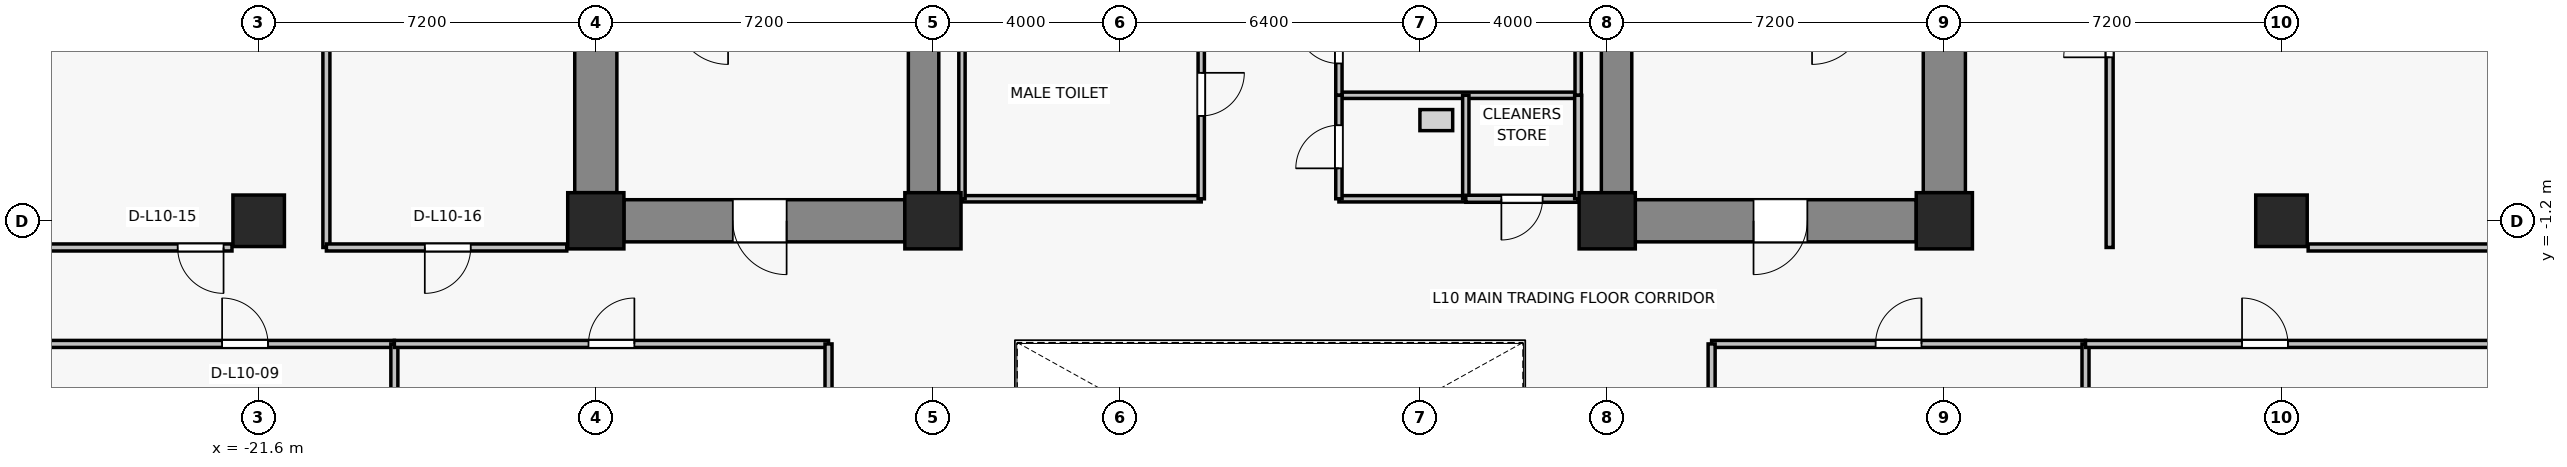
"""IFC4 building model, lengths in metres.
Left out: names, types, materials, properties, quantities, classifications, styles, units other than length and angle.
Written with IfcOpenShell. Run it as: python <this file> out.ifc"""

import sys

from ifc_helpers import new_model, si_unit, direction, frame, frame_2d, origin, origin_2d, place, context, subcontext, project, spatial, rectangle, extrude, source, transform, mapped, element, fill, save


model = new_model("IFC4")
c1 = context("Model", 3, precision=1e-05, world=origin(), true_north=direction((0.0, 1.0)))
c2 = subcontext(c1, "Body", "Model", "MODEL_VIEW")
j1 = project(units=[si_unit("LENGTHUNIT", "METRE"), si_unit("PLANEANGLEUNIT", "RADIAN")], contexts=[c1])
p1 = place(None, origin())
s1 = spatial("IfcSite", under=j1, at=p1, CompositionType="ELEMENT")
p2 = place(p1, origin())
s2 = spatial("IfcBuilding", under=s1, at=p2, CompositionType="ELEMENT")
p3 = place(p2, frame((0.0, 0.0, 40.6)))
s3 = spatial("IfcBuildingStorey", under=s2, at=p3, CompositionType="ELEMENT", Elevation=40.6)
for number, where, z_axis, x_axis in (
    (1, (-14.4, -1.2, 0.0), (0.0, 0.0, 1.0), (1.0, 0.0, 0.0)),
    (2, (-7.2, -1.2, 0.0), (0.0, 0.0, 1.0), (1.0, 0.0, 0.0)),
    (3, (7.2, -1.2, 0.0), (0.0, 0.0, 1.0), (1.0, 0.0, 0.0)),
    (4, (14.4, -1.2, 0.0), (0.0, 0.0, 1.0), (1.0, 0.0, 0.0)),
):
    element("IfcColumn", number, at=place(p3, frame(where, z_axis=z_axis, x_axis=x_axis)), inside=s3, PredefinedType="COLUMN", context=c2, shape_type="SweptSolid", body=[
        extrude(rectangle(XDim=1.2, YDim=1.2, at=origin_2d()), origin(), (0.0, 0.0, 1.0), 3.3),
    ])
for number, where, z_axis, x_axis in (
    (5, (-21.6, -1.2, 0.0), (0.0, 0.0, 1.0), (1.0, 0.0, 0.0)),
    (6, (21.6, -1.2, 0.0), (0.0, 0.0, 1.0), (1.0, 0.0, 0.0)),
):
    element("IfcColumn", number, at=place(p3, frame(where, z_axis=z_axis, x_axis=x_axis)), inside=s3, PredefinedType="COLUMN", context=c2, shape_type="SweptSolid", body=[
        extrude(rectangle(XDim=1.1, YDim=1.1, at=origin_2d()), origin(), (0.0, 0.0, 1.0), 3.3),
    ])
for number, where, z_axis, x_axis in (
    (7, (-14.4, -0.6, 0.0), (0.0, 0.0, 1.0), (0.0, 1.0, 0.0)),
    (8, (14.4, -0.6, 0.0), (0.0, 0.0, 1.0), (0.0, 1.0, 0.0)),
):
    element("IfcWall", number, at=place(p3, frame(where, z_axis=z_axis, x_axis=x_axis)), inside=s3, PredefinedType="SHEAR", context=c2, shape_type="SweptSolid", body=[
        extrude(rectangle(XDim=6.6, YDim=0.9, at=frame_2d((3.3, 0.0))), origin(), (0.0, 0.0, 1.0), 3.075),
    ])
p4 = place(p3, frame((-7.8, -1.2, 0.0), z_axis=(0.0, 0.0, 1.0), x_axis=(-1.0, 0.0, 0.0)))
e9 = element("IfcWall", 9, at=p4, inside=s3, PredefinedType="SHEAR", context=c2, shape_type="SweptSolid", body=[
    extrude(rectangle(XDim=6.0, YDim=0.9, at=frame_2d((3.0, 0.0))), origin(), (0.0, 0.0, 1.0), 3.075),
])
p5 = place(p4, frame((2.525, 0.0, 0.0)))
e10 = element("IfcOpeningElement", 10, at=p5, cuts=e9, PredefinedType="OPENING", context=c2, shape_type="SweptSolid", body=[
    extrude(rectangle(XDim=1.15, YDim=2.15, at=frame_2d((0.575, 1.075))), frame((0.0, 0.46, 0.0), z_axis=(0.0, -1.0, 0.0), x_axis=(1.0, 0.0, 0.0)), (0.0, 0.0, 1.0), 0.92),
])
p6 = place(p3, frame((13.8, -1.2, 0.0), z_axis=(0.0, 0.0, 1.0), x_axis=(-1.0, 0.0, 0.0)))
e11 = element("IfcWall", 11, at=p6, inside=s3, PredefinedType="SHEAR", context=c2, shape_type="SweptSolid", body=[
    extrude(rectangle(XDim=6.0, YDim=0.9, at=frame_2d((3.0, 0.0))), origin(), (0.0, 0.0, 1.0), 3.075),
])
p7 = place(p6, frame((2.325, 0.0, 0.0)))
e12 = element("IfcOpeningElement", 12, at=p7, cuts=e11, PredefinedType="OPENING", context=c2, shape_type="SweptSolid", body=[
    extrude(rectangle(XDim=1.15, YDim=2.15, at=frame_2d((0.575, 1.075))), frame((0.0, 0.46, 0.0), z_axis=(0.0, -1.0, 0.0), x_axis=(1.0, 0.0, 0.0)), (0.0, 0.0, 1.0), 0.92),
])
for number, where, z_axis, x_axis in (
    (13, (-7.4, -0.75, 0.0), (0.0, 0.0, 1.0), (0.0, 1.0, 0.0)),
    (14, (7.4, -0.75, 0.0), (0.0, 0.0, 1.0), (0.0, 1.0, 0.0)),
):
    element("IfcWall", number, at=place(p3, frame(where, z_axis=z_axis, x_axis=x_axis)), inside=s3, PredefinedType="SHEAR", context=c2, shape_type="SweptSolid", body=[
        extrude(rectangle(XDim=4.0, YDim=0.65, at=frame_2d((2.0, 0.0))), origin(), (0.0, 0.0, 1.0), 3.075),
    ])
p8 = place(p3, frame((-1.47, -0.73, 0.0), z_axis=(0.0, 0.0, 1.0), x_axis=(-1.0, 0.0, 0.0)))
e15 = element("IfcWall", 15, at=p8, inside=s3, PredefinedType="PARTITIONING", context=c2, shape_type="SweptSolid", body=[
    extrude(rectangle(XDim=5.11, YDim=0.135, at=frame_2d((2.555, 0.0))), origin(), (0.0, 0.0, 1.0), 3.075),
])
p9 = place(p3, frame((-6.58, -0.73, 0.0), z_axis=(0.0, 0.0, 1.0), x_axis=(0.0, 1.0, 0.0)))
e16 = element("IfcWall", 16, at=p9, inside=s3, PredefinedType="PARTITIONING", context=c2, shape_type="SweptSolid", body=[
    extrude(rectangle(XDim=4.49, YDim=0.135, at=frame_2d((2.245, 0.0))), origin(), (0.0, 0.0, 1.0), 3.075),
])
p10 = place(p3, frame((-1.47, 3.76, 0.0), z_axis=(0.0, 0.0, 1.0), x_axis=(0.0, -1.0, 0.0)))
e17 = element("IfcWall", 17, at=p10, inside=s3, PredefinedType="PARTITIONING", context=c2, shape_type="SweptSolid", body=[
    extrude(rectangle(XDim=4.49, YDim=0.135, at=frame_2d((2.245, 0.0))), origin(), (0.0, 0.0, 1.0), 3.075),
])
p11 = place(p10, frame((1.8, 0.0, 0.0)))
e18 = element("IfcOpeningElement", 18, at=p11, cuts=e17, PredefinedType="OPENING", context=c2, shape_type="SweptSolid", body=[
    extrude(rectangle(XDim=0.92, YDim=2.1, at=frame_2d((0.46, 1.05))), frame((0.0, 0.077, 0.0), z_axis=(0.0, -1.0, 0.0), x_axis=(1.0, 0.0, 0.0)), (0.0, 0.0, 1.0), 0.155),
])
p12 = place(p3, frame((6.58, 1.48, 0.0), z_axis=(0.0, 0.0, 1.0), x_axis=(-1.0, 0.0, 0.0)))
e19 = element("IfcWall", 19, at=p12, inside=s3, PredefinedType="PARTITIONING", context=c2, shape_type="SweptSolid", body=[
    extrude(rectangle(XDim=5.11, YDim=0.135, at=frame_2d((2.555, 0.0))), origin(), (0.0, 0.0, 1.0), 3.075),
])
p13 = place(p3, frame((1.47, 1.48, 0.0), z_axis=(0.0, 0.0, 1.0), x_axis=(0.0, 1.0, 0.0)))
e20 = element("IfcWall", 20, at=p13, inside=s3, PredefinedType="PARTITIONING", context=c2, shape_type="SweptSolid", body=[
    extrude(rectangle(XDim=2.28, YDim=0.135, at=frame_2d((1.14, 0.0))), origin(), (0.0, 0.0, 1.0), 3.075),
])
p14 = place(p13, frame((0.68, 0.0, 0.0)))
e21 = element("IfcOpeningElement", 21, at=p14, cuts=e20, PredefinedType="OPENING", context=c2, shape_type="SweptSolid", body=[
    extrude(rectangle(XDim=0.92, YDim=2.1, at=frame_2d((0.46, 1.05))), frame((0.0, 0.077, 0.0), z_axis=(0.0, -1.0, 0.0), x_axis=(1.0, 0.0, 0.0)), (0.0, 0.0, 1.0), 0.155),
])
p15 = place(p3, frame((6.58, 3.76, 0.0), z_axis=(0.0, 0.0, 1.0), x_axis=(0.0, -1.0, 0.0)))
e22 = element("IfcWall", 22, at=p15, inside=s3, PredefinedType="PARTITIONING", context=c2, shape_type="SweptSolid", body=[
    extrude(rectangle(XDim=2.28, YDim=0.135, at=frame_2d((1.14, 0.0))), origin(), (0.0, 0.0, 1.0), 3.075),
])
p16 = place(p3, frame((4.18, -0.73, 0.0), z_axis=(0.0, 0.0, 1.0), x_axis=(-1.0, 0.0, 0.0)))
e23 = element("IfcWall", 23, at=p16, inside=s3, PredefinedType="PARTITIONING", context=c2, shape_type="SweptSolid", body=[
    extrude(rectangle(XDim=2.71, YDim=0.135, at=frame_2d((1.355, 0.0))), origin(), (0.0, 0.0, 1.0), 3.075),
])
p17 = place(p3, frame((1.47, -0.73, 0.0), z_axis=(0.0, 0.0, 1.0), x_axis=(0.0, 1.0, 0.0)))
e24 = element("IfcWall", 24, at=p17, inside=s3, PredefinedType="PARTITIONING", context=c2, shape_type="SweptSolid", body=[
    extrude(rectangle(XDim=2.21, YDim=0.135, at=frame_2d((1.105, 0.0))), origin(), (0.0, 0.0, 1.0), 3.075),
])
p18 = place(p17, frame((0.65, 0.0, 0.0)))
e25 = element("IfcOpeningElement", 25, at=p18, cuts=e24, PredefinedType="OPENING", context=c2, shape_type="SweptSolid", body=[
    extrude(rectangle(XDim=0.92, YDim=2.1, at=frame_2d((0.46, 1.05))), frame((0.0, 0.077, 0.0), z_axis=(0.0, -1.0, 0.0), x_axis=(1.0, 0.0, 0.0)), (0.0, 0.0, 1.0), 0.155),
])
p19 = place(p3, frame((4.18, 1.48, 0.0), z_axis=(0.0, 0.0, 1.0), x_axis=(0.0, -1.0, 0.0)))
e26 = element("IfcWall", 26, at=p19, inside=s3, PredefinedType="PARTITIONING", context=c2, shape_type="SweptSolid", body=[
    extrude(rectangle(XDim=2.21, YDim=0.135, at=frame_2d((1.105, 0.0))), origin(), (0.0, 0.0, 1.0), 3.075),
])
p20 = place(p3, frame((6.58, -0.73, 0.0), z_axis=(0.0, 0.0, 1.0), x_axis=(-1.0, 0.0, 0.0)))
e27 = element("IfcWall", 27, at=p20, inside=s3, PredefinedType="PARTITIONING", context=c2, shape_type="SweptSolid", body=[
    extrude(rectangle(XDim=2.4, YDim=0.15, at=frame_2d((1.2, 0.0))), origin(), (0.0, 0.0, 1.0), 3.075),
])
p21 = place(p20, frame((0.76, 0.0, 0.0)))
e28 = element("IfcOpeningElement", 28, at=p21, cuts=e27, PredefinedType="OPENING", context=c2, shape_type="SweptSolid", body=[
    extrude(rectangle(XDim=0.88, YDim=2.1, at=frame_2d((0.44, 1.05))), frame((0.0, 0.085, 0.0), z_axis=(0.0, -1.0, 0.0), x_axis=(1.0, 0.0, 0.0)), (0.0, 0.0, 1.0), 0.17),
])
p22 = place(p3, frame((6.58, 1.48, 0.0), z_axis=(0.0, 0.0, 1.0), x_axis=(0.0, -1.0, 0.0)))
e29 = element("IfcWall", 29, at=p22, inside=s3, PredefinedType="PARTITIONING", context=c2, shape_type="SweptSolid", body=[
    extrude(rectangle(XDim=2.21, YDim=0.15, at=frame_2d((1.105, 0.0))), origin(), (0.0, 0.0, 1.0), 3.075),
])
p23 = place(p3, frame((-32.53, -3.83, 0.0), z_axis=(0.0, 0.0, 1.0), x_axis=(1.0, 0.0, 0.0)))
e30 = element("IfcWall", 30, at=p23, inside=s3, PredefinedType="PARTITIONING", context=c2, shape_type="SweptSolid", body=[
    extrude(rectangle(XDim=13.828, YDim=0.15, at=frame_2d((6.914, 0.0))), origin(), (0.0, 0.0, 1.0), 2.465),
])
p24 = place(p23, frame((10.149, 0.0, 0.0)))
e31 = element("IfcOpeningElement", 31, at=p24, cuts=e30, PredefinedType="OPENING", context=c2, shape_type="SweptSolid", body=[
    extrude(rectangle(XDim=0.98, YDim=2.15, at=frame_2d((0.49, 1.075))), frame((0.0, 0.085, 0.0), z_axis=(0.0, -1.0, 0.0), x_axis=(1.0, 0.0, 0.0)), (0.0, 0.0, 1.0), 0.17),
])
p25 = place(p3, frame((-18.702, -3.83, 0.0), z_axis=(0.0, 0.0, 1.0), x_axis=(0.0, -1.0, 0.0)))
e32 = element("IfcWall", 32, at=p25, inside=s3, PredefinedType="PARTITIONING", context=c2, shape_type="SweptSolid", body=[
    extrude(rectangle(XDim=6.69, YDim=0.15, at=frame_2d((3.345, 0.0))), origin(), (0.0, 0.0, 1.0), 2.465),
])
p26 = place(p3, frame((-18.702, -3.83, 0.0), z_axis=(0.0, 0.0, 1.0), x_axis=(1.0, 0.0, 0.0)))
e33 = element("IfcWall", 33, at=p26, inside=s3, PredefinedType="PARTITIONING", context=c2, shape_type="SweptSolid", body=[
    extrude(rectangle(XDim=9.272, YDim=0.15, at=frame_2d((4.636, 0.0))), origin(), (0.0, 0.0, 1.0), 2.465),
])
p27 = place(p26, frame((4.146, 0.0, 0.0)))
e34 = element("IfcOpeningElement", 34, at=p27, cuts=e33, PredefinedType="OPENING", context=c2, shape_type="SweptSolid", body=[
    extrude(rectangle(XDim=0.98, YDim=2.15, at=frame_2d((0.49, 1.075))), frame((0.0, 0.085, 0.0), z_axis=(0.0, -1.0, 0.0), x_axis=(1.0, 0.0, 0.0)), (0.0, 0.0, 1.0), 0.17),
])
p28 = place(p3, frame((-9.43, -3.83, 0.0), z_axis=(0.0, 0.0, 1.0), x_axis=(0.0, -1.0, 0.0)))
e35 = element("IfcWall", 35, at=p28, inside=s3, PredefinedType="PARTITIONING", context=c2, shape_type="SweptSolid", body=[
    extrude(rectangle(XDim=6.69, YDim=0.15, at=frame_2d((3.345, 0.0))), origin(), (0.0, 0.0, 1.0), 2.465),
])
p29 = place(p3, frame((9.43, -3.83, 0.0), z_axis=(0.0, 0.0, 1.0), x_axis=(1.0, 0.0, 0.0)))
e36 = element("IfcWall", 36, at=p29, inside=s3, PredefinedType="PARTITIONING", context=c2, shape_type="SweptSolid", body=[
    extrude(rectangle(XDim=7.985, YDim=0.15, at=frame_2d((3.993, 0.0))), origin(), (0.0, 0.0, 1.0), 2.465),
])
p30 = place(p29, frame((3.502, 0.0, 0.0)))
e37 = element("IfcOpeningElement", 37, at=p30, cuts=e36, PredefinedType="OPENING", context=c2, shape_type="SweptSolid", body=[
    extrude(rectangle(XDim=0.98, YDim=2.15, at=frame_2d((0.49, 1.075))), frame((0.0, 0.085, 0.0), z_axis=(0.0, -1.0, 0.0), x_axis=(1.0, 0.0, 0.0)), (0.0, 0.0, 1.0), 0.17),
])
for number, where, z_axis, x_axis in (
    (38, (9.43, -10.52, 0.0), (0.0, 0.0, 1.0), (0.0, 1.0, 0.0)),
    (39, (17.415, -3.83, 0.0), (0.0, 0.0, 1.0), (0.0, -1.0, 0.0)),
):
    element("IfcWall", number, at=place(p3, frame(where, z_axis=z_axis, x_axis=x_axis)), inside=s3, PredefinedType="PARTITIONING", context=c2, shape_type="SweptSolid", body=[
        extrude(rectangle(XDim=6.69, YDim=0.15, at=frame_2d((3.345, 0.0))), origin(), (0.0, 0.0, 1.0), 2.465),
    ])
p31 = place(p3, frame((17.415, -3.83, 0.0), z_axis=(0.0, 0.0, 1.0), x_axis=(1.0, 0.0, 0.0)))
e40 = element("IfcWall", 40, at=p31, inside=s3, PredefinedType="PARTITIONING", context=c2, shape_type="SweptSolid", body=[
    extrude(rectangle(XDim=11.115, YDim=0.15, at=frame_2d((5.558, 0.0))), origin(), (0.0, 0.0, 1.0), 2.465),
])
p32 = place(p31, frame((3.343, 0.0, 0.0)))
e41 = element("IfcOpeningElement", 41, at=p32, cuts=e40, PredefinedType="OPENING", context=c2, shape_type="SweptSolid", body=[
    extrude(rectangle(XDim=0.98, YDim=2.15, at=frame_2d((0.49, 1.075))), frame((0.0, 0.085, 0.0), z_axis=(0.0, -1.0, 0.0), x_axis=(1.0, 0.0, 0.0)), (0.0, 0.0, 1.0), 0.17),
])
p33 = place(p3, frame((-22.17, -1.77, 0.0), z_axis=(0.0, 0.0, 1.0), x_axis=(-1.0, 0.0, 0.0)))
e42 = element("IfcWall", 42, at=p33, inside=s3, PredefinedType="PARTITIONING", context=c2, shape_type="SweptSolid", body=[
    extrude(rectangle(XDim=5.177, YDim=0.15, at=frame_2d((2.588, 0.0))), origin(), (0.0, 0.0, 1.0), 3.075),
])
p34 = place(p33, frame((0.18, 0.0, 0.0)))
e43 = element("IfcOpeningElement", 43, at=p34, cuts=e42, PredefinedType="OPENING", context=c2, shape_type="SweptSolid", body=[
    extrude(rectangle(XDim=0.98, YDim=2.15, at=frame_2d((0.49, 1.075))), frame((0.0, 0.085, 0.0), z_axis=(0.0, -1.0, 0.0), x_axis=(1.0, 0.0, 0.0)), (0.0, 0.0, 1.0), 0.17),
])
p35 = place(p3, frame((-20.154, 13.88, 0.0), z_axis=(0.0, 0.0, 1.0), x_axis=(0.0, -1.0, 0.0)))
e44 = element("IfcWall", 44, at=p35, inside=s3, PredefinedType="PARTITIONING", context=c2, shape_type="SweptSolid", body=[
    extrude(rectangle(XDim=15.65, YDim=0.15, at=frame_2d((7.825, 0.0))), origin(), (0.0, 0.0, 1.0), 2.465),
])
p36 = place(p3, frame((-15.02, -1.77, 0.0), z_axis=(0.0, 0.0, 1.0), x_axis=(-1.0, 0.0, 0.0)))
e45 = element("IfcWall", 45, at=p36, inside=s3, PredefinedType="PARTITIONING", context=c2, shape_type="SweptSolid", body=[
    extrude(rectangle(XDim=5.134, YDim=0.15, at=frame_2d((2.567, 0.0))), origin(), (0.0, 0.0, 1.0), 3.075),
])
p37 = place(p36, frame((2.052, 0.0, 0.0)))
e46 = element("IfcOpeningElement", 46, at=p37, cuts=e45, PredefinedType="OPENING", context=c2, shape_type="SweptSolid", body=[
    extrude(rectangle(XDim=0.98, YDim=2.15, at=frame_2d((0.49, 1.075))), frame((0.0, 0.085, 0.0), z_axis=(0.0, -1.0, 0.0), x_axis=(1.0, 0.0, 0.0)), (0.0, 0.0, 1.0), 0.17),
])
p38 = place(p3, frame((28.53, -1.77, 0.0), z_axis=(0.0, 0.0, 1.0), x_axis=(-1.0, 0.0, 0.0)))
e47 = element("IfcWall", 47, at=p38, inside=s3, PredefinedType="PARTITIONING", context=c2, shape_type="SweptSolid", body=[
    extrude(rectangle(XDim=6.36, YDim=0.15, at=frame_2d((3.18, 0.0))), origin(), (0.0, 0.0, 1.0), 2.465),
])
p39 = place(p3, frame((17.93, -1.77, 0.0), z_axis=(0.0, 0.0, 1.0), x_axis=(0.0, 1.0, 0.0)))
e48 = element("IfcWall", 48, at=p39, inside=s3, PredefinedType="PARTITIONING", context=c2, shape_type="SweptSolid", body=[
    extrude(rectangle(XDim=9.103, YDim=0.15, at=frame_2d((4.551, 0.0))), origin(), (0.0, 0.0, 1.0), 2.465),
])
p40 = place(p39, frame((4.061, 0.0, 0.0)))
e49 = element("IfcOpeningElement", 49, at=p40, cuts=e48, PredefinedType="OPENING", context=c2, shape_type="SweptSolid", body=[
    extrude(rectangle(XDim=0.98, YDim=2.15, at=frame_2d((0.49, 1.075))), frame((0.0, 0.085, 0.0), z_axis=(0.0, -1.0, 0.0), x_axis=(1.0, 0.0, 0.0)), (0.0, 0.0, 1.0), 0.17),
])
m1 = source(origin(), c2, "Body", "SweptSolid", [
    extrude(rectangle(XDim=1.15, YDim=2.15, at=frame_2d((0.575, 1.075))), frame((0.0, 0.025, 0.0), z_axis=(0.0, -1.0, 0.0), x_axis=(1.0, 0.0, 0.0)), (0.0, 0.0, 1.0), 0.05),
])
p41 = place(p5, origin())
e50 = element("IfcDoor", 50, at=p41, inside=s3, OperationType="SINGLE_SWING_LEFT", PredefinedType="DOOR", context=c2, shape_type="MappedRepresentation", body=[
    mapped(m1, transform((0.0, 0.0, 0.0), x_axis=(1.0, 0.0, 0.0), y_axis=(0.0, 1.0, 0.0), z_axis=(0.0, 0.0, 1.0), scale=1.0)),
])
fill(e10, e50)
p42 = place(p7, origin())
e51 = element("IfcDoor", 51, at=p42, inside=s3, OperationType="SINGLE_SWING_RIGHT", PredefinedType="DOOR", context=c2, shape_type="MappedRepresentation", body=[
    mapped(m1, transform((0.0, 0.0, 0.0), x_axis=(1.0, 0.0, 0.0), y_axis=(0.0, 1.0, 0.0), z_axis=(0.0, 0.0, 1.0), scale=1.0)),
])
fill(e12, e51)
m2 = source(origin(), c2, "Body", "SweptSolid", [
    extrude(rectangle(XDim=0.92, YDim=2.1, at=frame_2d((0.46, 1.05))), frame((0.0, 0.025, 0.0), z_axis=(0.0, -1.0, 0.0), x_axis=(1.0, 0.0, 0.0)), (0.0, 0.0, 1.0), 0.05),
])
p43 = place(p11, origin())
e52 = element("IfcDoor", 52, at=p43, inside=s3, OperationType="SINGLE_SWING_LEFT", PredefinedType="DOOR", context=c2, shape_type="MappedRepresentation", body=[
    mapped(m2, transform((0.0, 0.0, 0.0), x_axis=(1.0, 0.0, 0.0), y_axis=(0.0, 1.0, 0.0), z_axis=(0.0, 0.0, 1.0), scale=1.0)),
])
fill(e18, e52)
p44 = place(p14, origin())
e53 = element("IfcDoor", 53, at=p44, inside=s3, OperationType="SINGLE_SWING_RIGHT", PredefinedType="DOOR", context=c2, shape_type="MappedRepresentation", body=[
    mapped(m2, transform((0.0, 0.0, 0.0), x_axis=(1.0, 0.0, 0.0), y_axis=(0.0, 1.0, 0.0), z_axis=(0.0, 0.0, 1.0), scale=1.0)),
])
fill(e21, e53)
p45 = place(p18, origin())
e54 = element("IfcDoor", 54, at=p45, inside=s3, OperationType="SINGLE_SWING_LEFT", PredefinedType="DOOR", context=c2, shape_type="MappedRepresentation", body=[
    mapped(m2, transform((0.0, 0.0, 0.0), x_axis=(1.0, 0.0, 0.0), y_axis=(0.0, 1.0, 0.0), z_axis=(0.0, 0.0, 1.0), scale=1.0)),
])
fill(e25, e54)
m3 = source(origin(), c2, "Body", "SweptSolid", [
    extrude(rectangle(XDim=0.88, YDim=2.1, at=frame_2d((0.44, 1.05))), frame((0.0, 0.025, 0.0), z_axis=(0.0, -1.0, 0.0), x_axis=(1.0, 0.0, 0.0)), (0.0, 0.0, 1.0), 0.05),
])
p46 = place(p21, origin())
e55 = element("IfcDoor", 55, at=p46, inside=s3, OperationType="SINGLE_SWING_RIGHT", PredefinedType="DOOR", context=c2, shape_type="MappedRepresentation", body=[
    mapped(m3, transform((0.0, 0.0, 0.0), x_axis=(1.0, 0.0, 0.0), y_axis=(0.0, 1.0, 0.0), z_axis=(0.0, 0.0, 1.0), scale=1.0)),
])
fill(e28, e55)
m4 = source(origin(), c2, "Body", "SweptSolid", [
    extrude(rectangle(XDim=0.98, YDim=2.15, at=frame_2d((0.49, 1.075))), frame((0.0, 0.025, 0.0), z_axis=(0.0, -1.0, 0.0), x_axis=(1.0, 0.0, 0.0)), (0.0, 0.0, 1.0), 0.05),
])
p47 = place(p24, origin())
e56 = element("IfcDoor", 56, at=p47, inside=s3, OperationType="SINGLE_SWING_LEFT", PredefinedType="DOOR", context=c2, shape_type="MappedRepresentation", body=[
    mapped(m4, transform((0.0, 0.0, 0.0), x_axis=(1.0, 0.0, 0.0), y_axis=(0.0, 1.0, 0.0), z_axis=(0.0, 0.0, 1.0), scale=1.0)),
])
fill(e31, e56)
p48 = place(p27, origin())
e57 = element("IfcDoor", 57, at=p48, inside=s3, OperationType="SINGLE_SWING_RIGHT", PredefinedType="DOOR", context=c2, shape_type="MappedRepresentation", body=[
    mapped(m4, transform((0.0, 0.0, 0.0), x_axis=(1.0, 0.0, 0.0), y_axis=(0.0, 1.0, 0.0), z_axis=(0.0, 0.0, 1.0), scale=1.0)),
])
fill(e34, e57)
p49 = place(p30, origin())
e58 = element("IfcDoor", 58, at=p49, inside=s3, OperationType="SINGLE_SWING_RIGHT", PredefinedType="DOOR", context=c2, shape_type="MappedRepresentation", body=[
    mapped(m4, transform((0.0, 0.0, 0.0), x_axis=(1.0, 0.0, 0.0), y_axis=(0.0, 1.0, 0.0), z_axis=(0.0, 0.0, 1.0), scale=1.0)),
])
fill(e37, e58)
p50 = place(p32, origin())
e59 = element("IfcDoor", 59, at=p50, inside=s3, OperationType="SINGLE_SWING_LEFT", PredefinedType="DOOR", context=c2, shape_type="MappedRepresentation", body=[
    mapped(m4, transform((0.0, 0.0, 0.0), x_axis=(1.0, 0.0, 0.0), y_axis=(0.0, 1.0, 0.0), z_axis=(0.0, 0.0, 1.0), scale=1.0)),
])
fill(e41, e59)
p51 = place(p34, origin())
e60 = element("IfcDoor", 60, at=p51, inside=s3, OperationType="SINGLE_SWING_LEFT", PredefinedType="DOOR", context=c2, shape_type="MappedRepresentation", body=[
    mapped(m4, transform((0.0, 0.0, 0.0), x_axis=(1.0, 0.0, 0.0), y_axis=(0.0, 1.0, 0.0), z_axis=(0.0, 0.0, 1.0), scale=1.0)),
])
fill(e43, e60)
p52 = place(p37, origin())
e61 = element("IfcDoor", 61, at=p52, inside=s3, OperationType="SINGLE_SWING_RIGHT", PredefinedType="DOOR", context=c2, shape_type="MappedRepresentation", body=[
    mapped(m4, transform((0.0, 0.0, 0.0), x_axis=(1.0, 0.0, 0.0), y_axis=(0.0, 1.0, 0.0), z_axis=(0.0, 0.0, 1.0), scale=1.0)),
])
fill(e46, e61)
p53 = place(p40, origin())
e62 = element("IfcDoor", 62, at=p53, inside=s3, OperationType="SINGLE_SWING_LEFT", PredefinedType="DOOR", context=c2, shape_type="MappedRepresentation", body=[
    mapped(m4, transform((0.0, 0.0, 0.0), x_axis=(1.0, 0.0, 0.0), y_axis=(0.0, 1.0, 0.0), z_axis=(0.0, 0.0, 1.0), scale=1.0)),
])
fill(e49, e62)
save(model, sys.argv[1])
